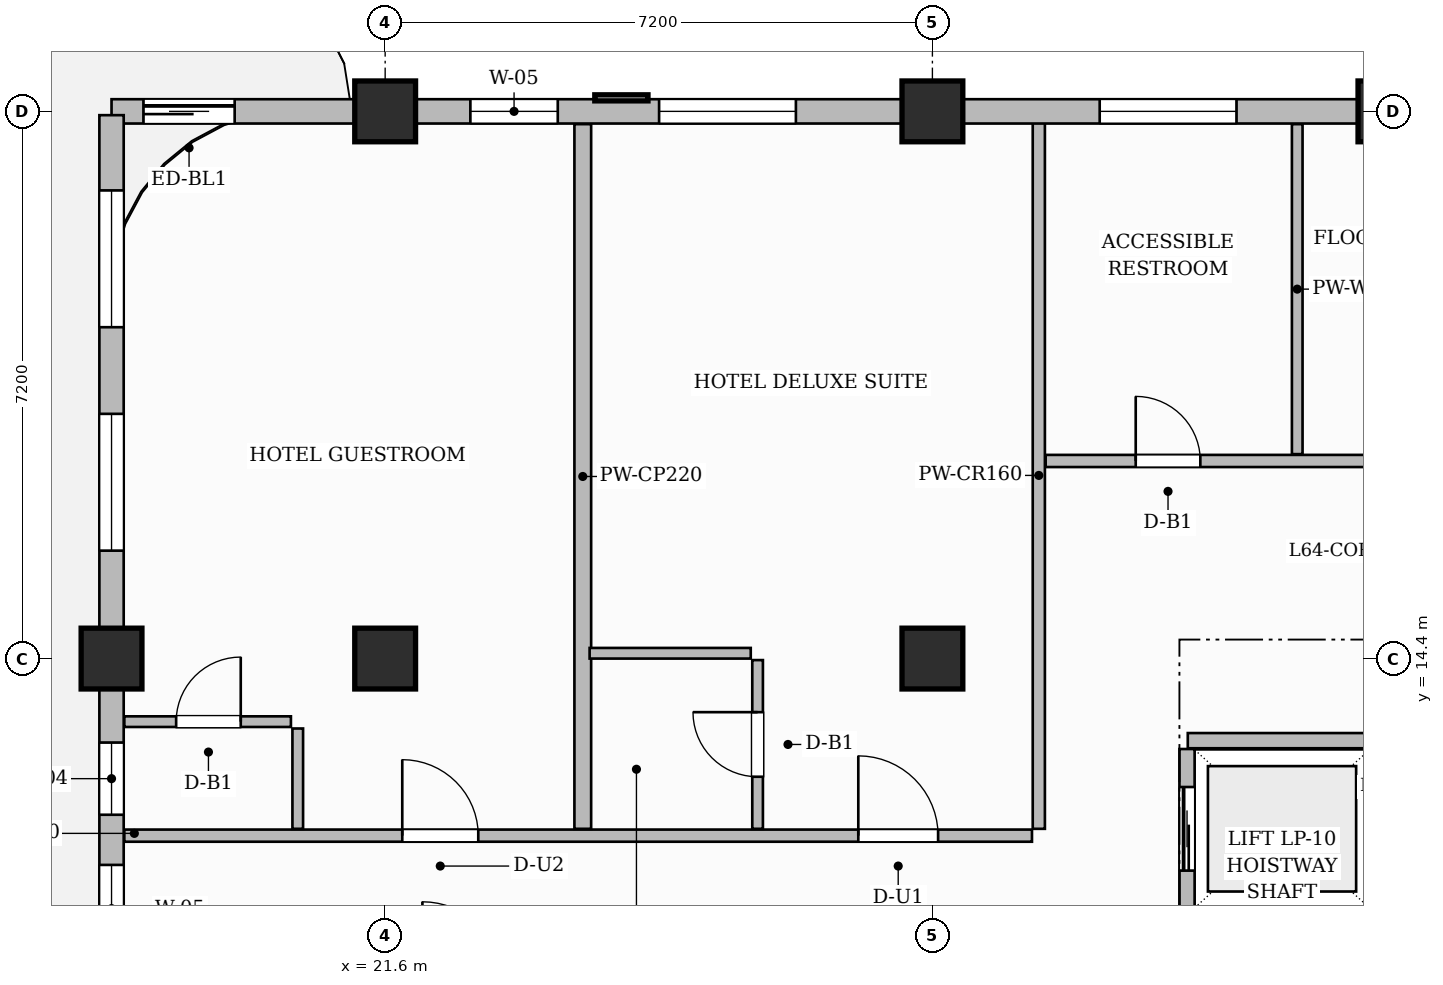
"""IFC4 building model, lengths in metres.
Left out: names, types, materials, properties, quantities, classifications, styles, units other than length and angle.
Written with IfcOpenShell. Run it as: python <this file> out.ifc"""

import sys

from ifc_helpers import new_model, si_unit, direction, frame, frame_2d, origin, origin_2d, place, context, subcontext, project, spatial, rectangle, extrude, source, transform, mapped, element, fill, save


model = new_model("IFC4")
c1 = context("Model", 3, precision=1e-05, world=origin(), true_north=direction((0.0, 1.0)))
c2 = subcontext(c1, "Body", "Model", "MODEL_VIEW")
j1 = project(units=[si_unit("LENGTHUNIT", "METRE"), si_unit("PLANEANGLEUNIT", "RADIAN")], contexts=[c1])
p1 = place(None, origin())
s1 = spatial("IfcSite", under=j1, at=p1, CompositionType="ELEMENT")
p2 = place(p1, origin())
s2 = spatial("IfcBuilding", under=s1, at=p2, CompositionType="ELEMENT")
p3 = place(p2, frame((0.0, 0.0, 255.8)))
s3 = spatial("IfcBuildingStorey", under=s2, at=p3, CompositionType="ELEMENT", Elevation=255.8)
m1 = source(origin(), c2, "Body", "SweptSolid", [
    extrude(rectangle(XDim=0.8, YDim=0.8, at=origin_2d()), origin(), (0.0, 0.0, 1.0), 3.85),
])
for number, where, z_axis, x_axis in (
    (1, (21.6, 14.4, 0.0), (0.0, 0.0, 1.0), (1.0, 0.0, 0.0)),
    (2, (21.6, 21.6, 0.0), (0.0, 0.0, 1.0), (1.0, 0.0, 0.0)),
    (3, (28.8, 14.4, 0.0), (0.0, 0.0, 1.0), (1.0, 0.0, 0.0)),
    (4, (28.8, 21.6, 0.0), (0.0, 0.0, 1.0), (1.0, 0.0, 0.0)),
    (5, (34.8, 21.6, 0.0), (0.0, 0.0, 1.0), (1.0, 0.0, 0.0)),
    (6, (18.0, 14.4, 0.0), (0.0, 0.0, 1.0), (1.0, 0.0, 0.0)),
):
    element("IfcColumn", number, at=place(p3, frame(where, z_axis=z_axis, x_axis=x_axis)), inside=s3, PredefinedType="COLUMN", context=c2, shape_type="MappedRepresentation", body=[
        mapped(m1, transform((0.0, 0.0, 0.0), scale=1.0)),
    ])
p4 = place(p3, frame((32.16, 13.32, 0.0), z_axis=(0.0, 0.0, 1.0), x_axis=(1.0, 0.0, 0.0)))
e7 = element("IfcWall", 7, at=p4, inside=s3, PredefinedType="PARTITIONING", context=c2, shape_type="SweptSolid", body=[
    extrude(rectangle(XDim=2.385, YDim=0.2, at=frame_2d((1.192, 0.0))), origin(), (0.0, 0.0, 1.0), 3.6),
])
p5 = place(p3, frame((32.15, 4.39, 0.0), z_axis=(0.0, 0.0, 1.0), x_axis=(0.0, 1.0, 0.0)))
e8 = element("IfcWall", 8, at=p5, inside=s3, PredefinedType="PARTITIONING", context=c2, shape_type="SweptSolid", body=[
    extrude(rectangle(XDim=8.82, YDim=0.2, at=frame_2d((4.41, 0.0))), origin(), (0.0, 0.0, 1.0), 3.6),
])
p6 = place(p5, frame((0.5, 0.0, 0.0)))
e9 = element("IfcOpeningElement", 9, at=p6, cuts=e8, PredefinedType="OPENING", context=c2, shape_type="SweptSolid", body=[
    extrude(rectangle(XDim=1.1, YDim=2.2, at=frame_2d((0.55, 1.1))), frame((0.0, 0.11, 0.0), z_axis=(0.0, -1.0, 0.0), x_axis=(1.0, 0.0, 0.0)), (0.0, 0.0, 1.0), 0.22),
])
p7 = place(p5, frame((2.74, 0.0, 0.0)))
e10 = element("IfcOpeningElement", 10, at=p7, cuts=e8, PredefinedType="OPENING", context=c2, shape_type="SweptSolid", body=[
    extrude(rectangle(XDim=1.1, YDim=2.2, at=frame_2d((0.55, 1.1))), frame((0.0, 0.11, 0.0), z_axis=(0.0, -1.0, 0.0), x_axis=(1.0, 0.0, 0.0)), (0.0, 0.0, 1.0), 0.22),
])
p8 = place(p5, frame((4.98, 0.0, 0.0)))
e11 = element("IfcOpeningElement", 11, at=p8, cuts=e8, PredefinedType="OPENING", context=c2, shape_type="SweptSolid", body=[
    extrude(rectangle(XDim=1.1, YDim=2.2, at=frame_2d((0.55, 1.1))), frame((0.0, 0.11, 0.0), z_axis=(0.0, -1.0, 0.0), x_axis=(1.0, 0.0, 0.0)), (0.0, 0.0, 1.0), 0.22),
])
p9 = place(p5, frame((7.22, 0.0, 0.0)))
e12 = element("IfcOpeningElement", 12, at=p9, cuts=e8, PredefinedType="OPENING", context=c2, shape_type="SweptSolid", body=[
    extrude(rectangle(XDim=1.1, YDim=2.2, at=frame_2d((0.55, 1.1))), frame((0.0, 0.11, 0.0), z_axis=(0.0, -1.0, 0.0), x_axis=(1.0, 0.0, 0.0)), (0.0, 0.0, 1.0), 0.22),
])
p10 = place(p3, frame((18.168, 12.07, 0.0), z_axis=(0.0, 0.0, 1.0), x_axis=(1.0, 0.0, 0.0)))
e13 = element("IfcWall", 13, at=p10, inside=s3, PredefinedType="PARTITIONING", context=c2, shape_type="SweptSolid", body=[
    extrude(rectangle(XDim=11.942, YDim=0.16, at=frame_2d((5.971, 0.0))), origin(), (0.0, 0.0, 1.0), 3.6),
])
p11 = place(p10, frame((3.657, 0.0, 0.0)))
e14 = element("IfcOpeningElement", 14, at=p11, cuts=e13, PredefinedType="OPENING", context=c2, shape_type="SweptSolid", body=[
    extrude(rectangle(XDim=1.0, YDim=2.2, at=frame_2d((0.5, 1.1))), frame((0.0, 0.09, 0.0), z_axis=(0.0, -1.0, 0.0), x_axis=(1.0, 0.0, 0.0)), (0.0, 0.0, 1.0), 0.18),
])
p12 = place(p10, frame((9.657, 0.0, 0.0)))
e15 = element("IfcOpeningElement", 15, at=p12, cuts=e13, PredefinedType="OPENING", context=c2, shape_type="SweptSolid", body=[
    extrude(rectangle(XDim=1.05, YDim=2.25, at=frame_2d((0.525, 1.125))), frame((0.0, 0.09, 0.0), z_axis=(0.0, -1.0, 0.0), x_axis=(1.0, 0.0, 0.0)), (0.0, 0.0, 1.0), 0.18),
])
p13 = place(p3, frame((30.2, 12.16, 0.0), z_axis=(0.0, 0.0, 1.0), x_axis=(0.0, 1.0, 0.0)))
e16 = element("IfcWall", 16, at=p13, inside=s3, PredefinedType="PARTITIONING", context=c2, shape_type="SweptSolid", body=[
    extrude(rectangle(XDim=9.3, YDim=0.16, at=frame_2d((4.65, 0.0))), origin(), (0.0, 0.0, 1.0), 3.6),
])
p14 = place(p3, frame((30.29, 17.0, 0.0), z_axis=(0.0, 0.0, 1.0), x_axis=(1.0, 0.0, 0.0)))
e17 = element("IfcWall", 17, at=p14, inside=s3, PredefinedType="PARTITIONING", context=c2, shape_type="SweptSolid", body=[
    extrude(rectangle(XDim=19.37, YDim=0.16, at=frame_2d((9.685, 0.0))), origin(), (0.0, 0.0, 1.0), 3.6),
])
p15 = place(p14, frame((1.185, 0.0, 0.0)))
e18 = element("IfcOpeningElement", 18, at=p15, cuts=e17, PredefinedType="OPENING", context=c2, shape_type="SweptSolid", body=[
    extrude(rectangle(XDim=0.85, YDim=2.1, at=frame_2d((0.425, 1.05))), frame((0.0, 0.09, 0.0), z_axis=(0.0, -1.0, 0.0), x_axis=(1.0, 0.0, 0.0)), (0.0, 0.0, 1.0), 0.18),
])
p16 = place(p14, frame((6.66, 0.0, 0.0)))
e19 = element("IfcOpeningElement", 19, at=p16, cuts=e17, PredefinedType="OPENING", context=c2, shape_type="SweptSolid", body=[
    extrude(rectangle(XDim=0.9, YDim=2.15, at=frame_2d((0.45, 1.075))), frame((0.0, 0.09, 0.0), z_axis=(0.0, -1.0, 0.0), x_axis=(1.0, 0.0, 0.0)), (0.0, 0.0, 1.0), 0.18),
])
p17 = place(p14, frame((14.46, 0.0, 0.0)))
e20 = element("IfcOpeningElement", 20, at=p17, cuts=e17, PredefinedType="OPENING", context=c2, shape_type="SweptSolid", body=[
    extrude(rectangle(XDim=1.4, YDim=2.35, at=frame_2d((0.7, 1.175))), frame((0.0, 0.09, 0.0), z_axis=(0.0, -1.0, 0.0), x_axis=(1.0, 0.0, 0.0)), (0.0, 0.0, 1.0), 0.18),
])
p18 = place(p3, frame((33.6, 17.09, 0.0), z_axis=(0.0, 0.0, 1.0), x_axis=(0.0, 1.0, 0.0)))
e21 = element("IfcWall", 21, at=p18, inside=s3, PredefinedType="PARTITIONING", context=c2, shape_type="SweptSolid", body=[
    extrude(rectangle(XDim=4.342, YDim=0.14, at=frame_2d((2.171, 0.0))), origin(), (0.0, 0.0, 1.0), 3.6),
])
p19 = place(p3, frame((24.2, 12.16, 0.0), z_axis=(0.0, 0.0, 1.0), x_axis=(0.0, 1.0, 0.0)))
e22 = element("IfcWall", 22, at=p19, inside=s3, PredefinedType="PARTITIONING", context=c2, shape_type="SweptSolid", body=[
    extrude(rectangle(XDim=9.272, YDim=0.22, at=frame_2d((4.636, 0.0))), origin(), (0.0, 0.0, 1.0), 3.6),
])
p20 = place(p3, frame((20.45, 12.16, 0.0), z_axis=(0.0, 0.0, 1.0), x_axis=(0.0, 1.0, 0.0)))
e23 = element("IfcWall", 23, at=p20, inside=s3, PredefinedType="PARTITIONING", context=c2, shape_type="SweptSolid", body=[
    extrude(rectangle(XDim=1.32, YDim=0.14, at=frame_2d((0.66, 0.0))), origin(), (0.0, 0.0, 1.0), 3.6),
])
p21 = place(p3, frame((18.168, 13.57, 0.0), z_axis=(0.0, 0.0, 1.0), x_axis=(1.0, 0.0, 0.0)))
e24 = element("IfcWall", 24, at=p21, inside=s3, PredefinedType="PARTITIONING", context=c2, shape_type="SweptSolid", body=[
    extrude(rectangle(XDim=2.192, YDim=0.14, at=frame_2d((1.096, 0.0))), origin(), (0.0, 0.0, 1.0), 3.6),
])
p22 = place(p21, frame((0.682, 0.0, 0.0)))
e25 = element("IfcOpeningElement", 25, at=p22, cuts=e24, PredefinedType="OPENING", context=c2, shape_type="SweptSolid", body=[
    extrude(rectangle(XDim=0.85, YDim=2.1, at=frame_2d((0.425, 1.05))), frame((0.0, 0.08, 0.0), z_axis=(0.0, -1.0, 0.0), x_axis=(1.0, 0.0, 0.0)), (0.0, 0.0, 1.0), 0.16),
])
p23 = place(p3, frame((26.5, 12.16, 0.0), z_axis=(0.0, 0.0, 1.0), x_axis=(0.0, 1.0, 0.0)))
e26 = element("IfcWall", 26, at=p23, inside=s3, PredefinedType="PARTITIONING", context=c2, shape_type="SweptSolid", body=[
    extrude(rectangle(XDim=2.22, YDim=0.14, at=frame_2d((1.11, 0.0))), origin(), (0.0, 0.0, 1.0), 3.6),
])
p24 = place(p23, frame((0.685, 0.0, 0.0)))
e27 = element("IfcOpeningElement", 27, at=p24, cuts=e26, PredefinedType="OPENING", context=c2, shape_type="SweptSolid", body=[
    extrude(rectangle(XDim=0.85, YDim=2.1, at=frame_2d((0.425, 1.05))), frame((0.0, 0.08, 0.0), z_axis=(0.0, -1.0, 0.0), x_axis=(1.0, 0.0, 0.0)), (0.0, 0.0, 1.0), 0.16),
])
p25 = place(p3, frame((24.29, 14.47, 0.0), z_axis=(0.0, 0.0, 1.0), x_axis=(1.0, 0.0, 0.0)))
e28 = element("IfcWall", 28, at=p25, inside=s3, PredefinedType="PARTITIONING", context=c2, shape_type="SweptSolid", body=[
    extrude(rectangle(XDim=2.12, YDim=0.14, at=frame_2d((1.06, 0.0))), origin(), (0.0, 0.0, 1.0), 3.135),
])
p26 = place(p3, frame((18.0, 21.6, 0.0), z_axis=(0.0, 0.0, 1.0), x_axis=(1.0, 0.0, 0.0)))
e29 = element("IfcWall", 29, at=p26, inside=s3, PredefinedType="SOLIDWALL", context=c2, shape_type="SweptSolid", body=[
    extrude(rectangle(XDim=31.8, YDim=0.32, at=frame_2d((15.9, 0.0))), origin(), (0.0, 0.0, 1.0), 3.135),
])
p27 = place(p26, frame((0.42, 0.0, 0.0)))
e30 = element("IfcOpeningElement", 30, at=p27, cuts=e29, PredefinedType="OPENING", context=c2, shape_type="SweptSolid", body=[
    extrude(rectangle(XDim=1.2, YDim=2.2, at=frame_2d((0.6, 1.1))), frame((0.0, 0.17, 0.0), z_axis=(0.0, -1.0, 0.0), x_axis=(1.0, 0.0, 0.0)), (0.0, 0.0, 1.0), 0.34),
])
p28 = place(p26, frame((4.721, 0.0, 0.8)))
e31 = element("IfcOpeningElement", 31, at=p28, cuts=e29, PredefinedType="OPENING", context=c2, shape_type="SweptSolid", body=[
    extrude(rectangle(XDim=1.15, YDim=1.8, at=frame_2d((0.575, 0.9))), frame((0.0, 0.17, 0.0), z_axis=(0.0, -1.0, 0.0), x_axis=(1.0, 0.0, 0.0)), (0.0, 0.0, 1.0), 0.34),
])
p29 = place(p26, frame((7.204, 0.0, 0.8)))
e32 = element("IfcOpeningElement", 32, at=p29, cuts=e29, PredefinedType="OPENING", context=c2, shape_type="SweptSolid", body=[
    extrude(rectangle(XDim=1.8, YDim=1.85, at=frame_2d((0.9, 0.925))), frame((0.0, 0.17, 0.0), z_axis=(0.0, -1.0, 0.0), x_axis=(1.0, 0.0, 0.0)), (0.0, 0.0, 1.0), 0.34),
])
p30 = place(p26, frame((13.001, 0.0, 0.8)))
e33 = element("IfcOpeningElement", 33, at=p30, cuts=e29, PredefinedType="OPENING", context=c2, shape_type="SweptSolid", body=[
    extrude(rectangle(XDim=1.8, YDim=1.85, at=frame_2d((0.9, 0.925))), frame((0.0, 0.17, 0.0), z_axis=(0.0, -1.0, 0.0), x_axis=(1.0, 0.0, 0.0)), (0.0, 0.0, 1.0), 0.34),
])
p31 = place(p26, frame((18.123, 0.0, 0.8)))
e34 = element("IfcOpeningElement", 34, at=p31, cuts=e29, PredefinedType="OPENING", context=c2, shape_type="SweptSolid", body=[
    extrude(rectangle(XDim=1.8, YDim=1.85, at=frame_2d((0.9, 0.925))), frame((0.0, 0.17, 0.0), z_axis=(0.0, -1.0, 0.0), x_axis=(1.0, 0.0, 0.0)), (0.0, 0.0, 1.0), 0.34),
])
p32 = place(p26, frame((20.869, 0.0, 0.8)))
e35 = element("IfcOpeningElement", 35, at=p32, cuts=e29, PredefinedType="OPENING", context=c2, shape_type="SweptSolid", body=[
    extrude(rectangle(XDim=1.8, YDim=1.85, at=frame_2d((0.9, 0.925))), frame((0.0, 0.17, 0.0), z_axis=(0.0, -1.0, 0.0), x_axis=(1.0, 0.0, 0.0)), (0.0, 0.0, 1.0), 0.34),
])
p33 = place(p26, frame((25.475, 0.0, 0.8)))
e36 = element("IfcOpeningElement", 36, at=p33, cuts=e29, PredefinedType="OPENING", context=c2, shape_type="SweptSolid", body=[
    extrude(rectangle(XDim=1.8, YDim=1.85, at=frame_2d((0.9, 0.925))), frame((0.0, 0.17, 0.0), z_axis=(0.0, -1.0, 0.0), x_axis=(1.0, 0.0, 0.0)), (0.0, 0.0, 1.0), 0.34),
])
p34 = place(p26, frame((28.525, 0.0, 0.8)))
e37 = element("IfcOpeningElement", 37, at=p34, cuts=e29, PredefinedType="OPENING", context=c2, shape_type="SweptSolid", body=[
    extrude(rectangle(XDim=1.8, YDim=1.85, at=frame_2d((0.9, 0.925))), frame((0.0, 0.17, 0.0), z_axis=(0.0, -1.0, 0.0), x_axis=(1.0, 0.0, 0.0)), (0.0, 0.0, 1.0), 0.34),
])
p35 = place(p3, frame((18.0, 0.05, 0.0), z_axis=(0.0, 0.0, 1.0), x_axis=(0.0, 1.0, 0.0)))
e38 = element("IfcWall", 38, at=p35, inside=s3, PredefinedType="SOLIDWALL", context=c2, shape_type="SweptSolid", body=[
    extrude(rectangle(XDim=21.5, YDim=0.32, at=frame_2d((10.75, 0.0))), origin(), (0.0, 0.0, 1.0), 3.6),
])
p36 = place(p35, frame((1.831, 0.0, 0.8)))
e39 = element("IfcOpeningElement", 39, at=p36, cuts=e38, PredefinedType="OPENING", context=c2, shape_type="SweptSolid", body=[
    extrude(rectangle(XDim=1.8, YDim=1.85, at=frame_2d((0.9, 0.925))), frame((0.0, 0.17, 0.0), z_axis=(0.0, -1.0, 0.0), x_axis=(1.0, 0.0, 0.0)), (0.0, 0.0, 1.0), 0.34),
])
p37 = place(p35, frame((8.321, 0.0, 0.8)))
e40 = element("IfcOpeningElement", 40, at=p37, cuts=e38, PredefinedType="OPENING", context=c2, shape_type="SweptSolid", body=[
    extrude(rectangle(XDim=1.4, YDim=1.85, at=frame_2d((0.7, 0.925))), frame((0.0, 0.17, 0.0), z_axis=(0.0, -1.0, 0.0), x_axis=(1.0, 0.0, 0.0)), (0.0, 0.0, 1.0), 0.34),
])
p38 = place(p35, frame((10.485, 0.0, 0.8)))
e41 = element("IfcOpeningElement", 41, at=p38, cuts=e38, PredefinedType="OPENING", context=c2, shape_type="SweptSolid", body=[
    extrude(rectangle(XDim=1.15, YDim=1.8, at=frame_2d((0.575, 0.9))), frame((0.0, 0.17, 0.0), z_axis=(0.0, -1.0, 0.0), x_axis=(1.0, 0.0, 0.0)), (0.0, 0.0, 1.0), 0.34),
])
p39 = place(p35, frame((12.295, 0.0, 0.8)))
e42 = element("IfcOpeningElement", 42, at=p39, cuts=e38, PredefinedType="OPENING", context=c2, shape_type="SweptSolid", body=[
    extrude(rectangle(XDim=0.95, YDim=1.75, at=frame_2d((0.475, 0.875))), frame((0.0, 0.17, 0.0), z_axis=(0.0, -1.0, 0.0), x_axis=(1.0, 0.0, 0.0)), (0.0, 0.0, 1.0), 0.34),
])
p40 = place(p35, frame((15.77, 0.0, 0.8)))
e43 = element("IfcOpeningElement", 43, at=p40, cuts=e38, PredefinedType="OPENING", context=c2, shape_type="SweptSolid", body=[
    extrude(rectangle(XDim=1.8, YDim=1.85, at=frame_2d((0.9, 0.925))), frame((0.0, 0.17, 0.0), z_axis=(0.0, -1.0, 0.0), x_axis=(1.0, 0.0, 0.0)), (0.0, 0.0, 1.0), 0.34),
])
p41 = place(p35, frame((18.71, 0.0, 0.8)))
e44 = element("IfcOpeningElement", 44, at=p41, cuts=e38, PredefinedType="OPENING", context=c2, shape_type="SweptSolid", body=[
    extrude(rectangle(XDim=1.8, YDim=1.85, at=frame_2d((0.9, 0.925))), frame((0.0, 0.17, 0.0), z_axis=(0.0, -1.0, 0.0), x_axis=(1.0, 0.0, 0.0)), (0.0, 0.0, 1.0), 0.34),
])
m2 = source(origin(), c2, "Body", "SweptSolid", [
    extrude(rectangle(XDim=0.85, YDim=2.1, at=frame_2d((0.425, 1.05))), frame((0.0, 0.025, 0.0), z_axis=(0.0, -1.0, 0.0), x_axis=(1.0, 0.0, 0.0)), (0.0, 0.0, 1.0), 0.05),
])
p42 = place(p15, origin())
e45 = element("IfcDoor", 45, at=p42, inside=s3, OperationType="SINGLE_SWING_LEFT", PredefinedType="DOOR", context=c2, shape_type="MappedRepresentation", body=[
    mapped(m2, transform((0.0, 0.0, 0.0), scale=1.0)),
])
fill(e18, e45)
p43 = place(p22, origin())
e46 = element("IfcDoor", 46, at=p43, inside=s3, OperationType="SINGLE_SWING_RIGHT", PredefinedType="DOOR", context=c2, shape_type="MappedRepresentation", body=[
    mapped(m2, transform((0.0, 0.0, 0.0), scale=1.0)),
])
fill(e25, e46)
m3 = source(origin(), c2, "Body", "SweptSolid", [
    extrude(rectangle(XDim=1.0, YDim=2.2, at=frame_2d((0.5, 1.1))), frame((0.0, 0.025, 0.0), z_axis=(0.0, -1.0, 0.0), x_axis=(1.0, 0.0, 0.0)), (0.0, 0.0, 1.0), 0.05),
])
p44 = place(p11, origin())
e47 = element("IfcDoor", 47, at=p44, inside=s3, OperationType="SINGLE_SWING_LEFT", PredefinedType="DOOR", context=c2, shape_type="MappedRepresentation", body=[
    mapped(m3, transform((0.0, 0.0, 0.0), scale=1.0)),
])
fill(e14, e47)
p45 = place(p24, origin())
e48 = element("IfcDoor", 48, at=p45, inside=s3, OperationType="SINGLE_SWING_RIGHT", PredefinedType="DOOR", context=c2, shape_type="MappedRepresentation", body=[
    mapped(m2, transform((0.0, 0.0, 0.0), scale=1.0)),
])
fill(e27, e48)
m4 = source(origin(), c2, "Body", "SweptSolid", [
    extrude(rectangle(XDim=1.05, YDim=2.25, at=frame_2d((0.525, 1.125))), frame((0.0, 0.025, 0.0), z_axis=(0.0, -1.0, 0.0), x_axis=(1.0, 0.0, 0.0)), (0.0, 0.0, 1.0), 0.05),
])
p46 = place(p12, origin())
e49 = element("IfcDoor", 49, at=p46, inside=s3, OperationType="SINGLE_SWING_LEFT", PredefinedType="DOOR", context=c2, shape_type="MappedRepresentation", body=[
    mapped(m4, transform((0.0, 0.0, 0.0), scale=1.0)),
])
fill(e15, e49)
m5 = source(origin(), c2, "Body", "SweptSolid", [
    extrude(rectangle(XDim=1.1, YDim=2.2, at=frame_2d((0.55, 1.1))), frame((0.0, 0.025, 0.0), z_axis=(0.0, -1.0, 0.0), x_axis=(1.0, 0.0, 0.0)), (0.0, 0.0, 1.0), 0.05),
])
p47 = place(p9, origin())
e50 = element("IfcDoor", 50, at=p47, inside=s3, OperationType="SLIDING_TO_LEFT", PredefinedType="DOOR", context=c2, shape_type="MappedRepresentation", body=[
    mapped(m5, transform((0.0, 0.0, 0.0), scale=1.0)),
])
fill(e12, e50)
m6 = source(origin(), c2, "Body", "SweptSolid", [
    extrude(rectangle(XDim=1.2, YDim=2.2, at=frame_2d((0.6, 1.1))), frame((0.0, 0.025, 0.0), z_axis=(0.0, -1.0, 0.0), x_axis=(1.0, 0.0, 0.0)), (0.0, 0.0, 1.0), 0.05),
])
p48 = place(p27, origin())
e51 = element("IfcDoor", 51, at=p48, inside=s3, OperationType="SLIDING_TO_LEFT", PredefinedType="DOOR", context=c2, shape_type="MappedRepresentation", body=[
    mapped(m6, transform((0.0, 0.0, 0.0), scale=1.0)),
])
fill(e30, e51)
m7 = source(origin(), c2, "Body", "SweptSolid", [
    extrude(rectangle(XDim=1.15, YDim=1.8, at=frame_2d((0.575, 0.9))), frame((0.0, 0.03, 0.0), z_axis=(0.0, -1.0, 0.0), x_axis=(1.0, 0.0, 0.0)), (0.0, 0.0, 1.0), 0.06),
])
p49 = place(p28, origin())
e52 = element("IfcWindow", 52, at=p49, inside=s3, PartitioningType="SINGLE_PANEL", PredefinedType="WINDOW", context=c2, shape_type="MappedRepresentation", body=[
    mapped(m7, transform((0.0, 0.0, 0.0), scale=1.0)),
])
fill(e31, e52)
m8 = source(origin(), c2, "Body", "SweptSolid", [
    extrude(rectangle(XDim=1.8, YDim=1.85, at=frame_2d((0.9, 0.925))), frame((0.0, 0.03, 0.0), z_axis=(0.0, -1.0, 0.0), x_axis=(1.0, 0.0, 0.0)), (0.0, 0.0, 1.0), 0.06),
])
p50 = place(p29, origin())
e53 = element("IfcWindow", 53, at=p50, inside=s3, PartitioningType="DOUBLE_PANEL_VERTICAL", PredefinedType="WINDOW", context=c2, shape_type="MappedRepresentation", body=[
    mapped(m8, transform((0.0, 0.0, 0.0), scale=1.0)),
])
fill(e32, e53)
p51 = place(p30, origin())
e54 = element("IfcWindow", 54, at=p51, inside=s3, PartitioningType="DOUBLE_PANEL_VERTICAL", PredefinedType="WINDOW", context=c2, shape_type="MappedRepresentation", body=[
    mapped(m8, transform((0.0, 0.0, 0.0), scale=1.0)),
])
fill(e33, e54)
p52 = place(p38, origin())
e55 = element("IfcWindow", 55, at=p52, inside=s3, PartitioningType="SINGLE_PANEL", PredefinedType="WINDOW", context=c2, shape_type="MappedRepresentation", body=[
    mapped(m7, transform((0.0, 0.0, 0.0), scale=1.0)),
])
fill(e41, e55)
m9 = source(origin(), c2, "Body", "SweptSolid", [
    extrude(rectangle(XDim=0.95, YDim=1.75, at=frame_2d((0.475, 0.875))), frame((0.0, 0.03, 0.0), z_axis=(0.0, -1.0, 0.0), x_axis=(1.0, 0.0, 0.0)), (0.0, 0.0, 1.0), 0.06),
])
p53 = place(p39, origin())
e56 = element("IfcWindow", 56, at=p53, inside=s3, PartitioningType="SINGLE_PANEL", PredefinedType="WINDOW", context=c2, shape_type="MappedRepresentation", body=[
    mapped(m9, transform((0.0, 0.0, 0.0), scale=1.0)),
])
fill(e42, e56)
p54 = place(p40, origin())
e57 = element("IfcWindow", 57, at=p54, inside=s3, PartitioningType="DOUBLE_PANEL_VERTICAL", PredefinedType="WINDOW", context=c2, shape_type="MappedRepresentation", body=[
    mapped(m8, transform((0.0, 0.0, 0.0), scale=1.0)),
])
fill(e43, e57)
p55 = place(p41, origin())
e58 = element("IfcWindow", 58, at=p55, inside=s3, PartitioningType="DOUBLE_PANEL_VERTICAL", PredefinedType="WINDOW", context=c2, shape_type="MappedRepresentation", body=[
    mapped(m8, transform((0.0, 0.0, 0.0), scale=1.0)),
])
fill(e44, e58)
save(model, sys.argv[1])
